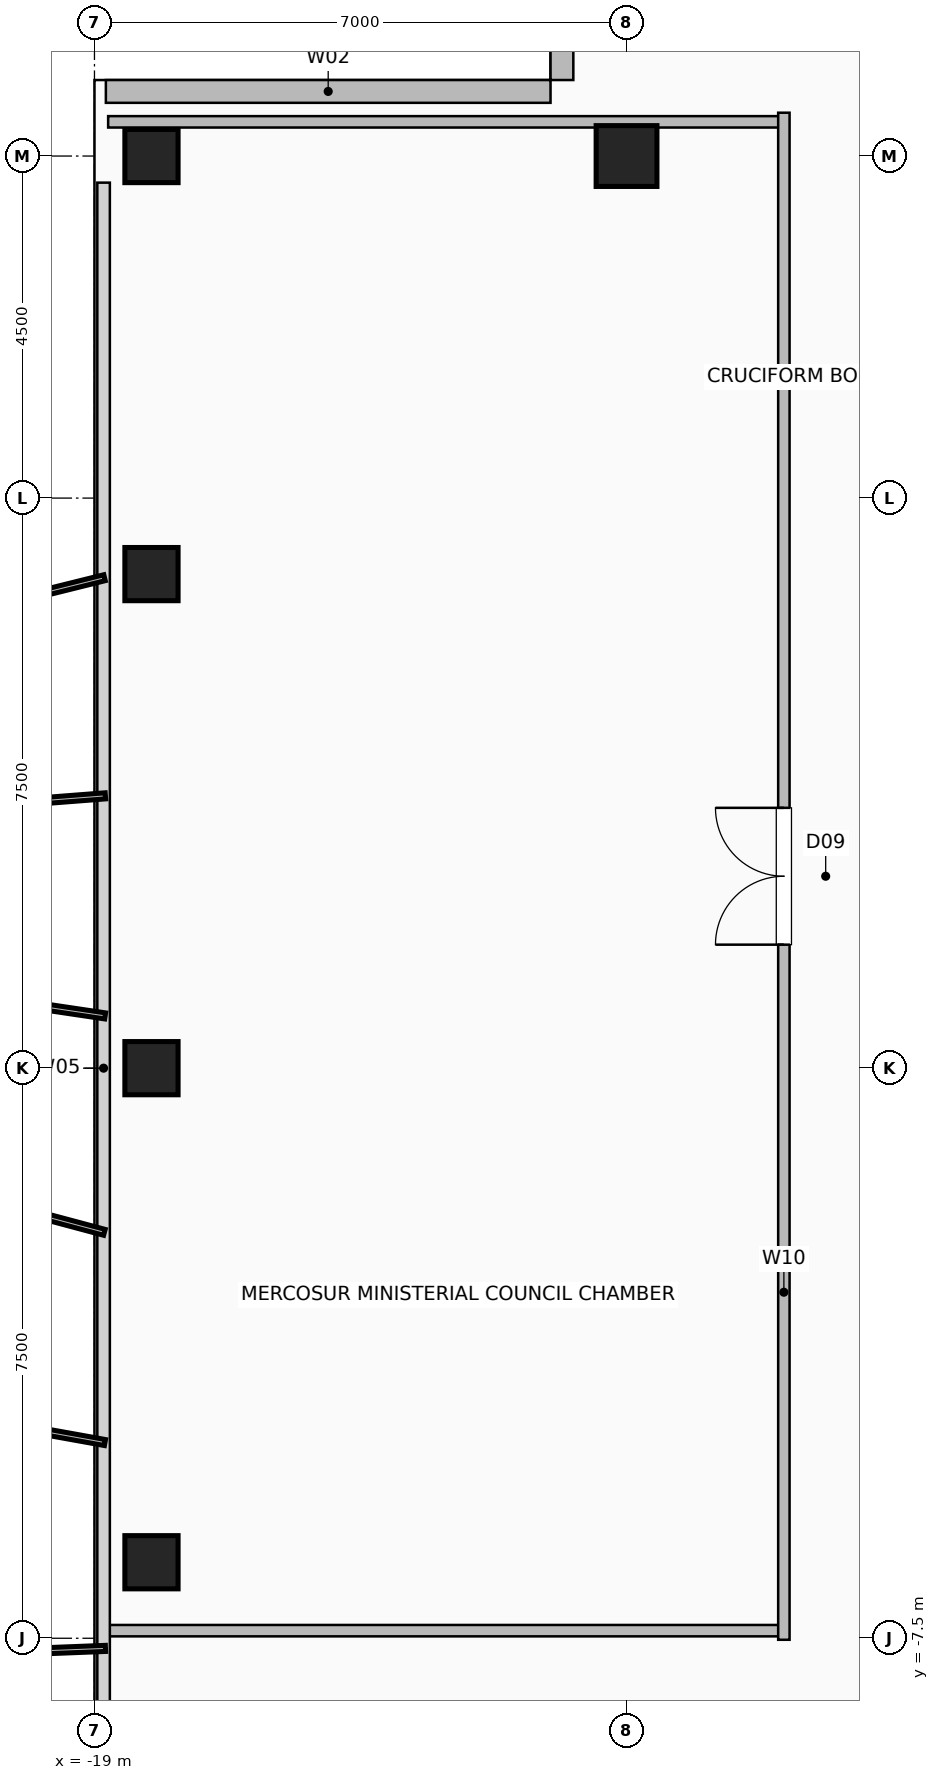
"""IFC4 building model, lengths in metres.
Left out: names, types, materials, properties, quantities, classifications, styles, units other than length and angle.
Written with IfcOpenShell. Run it as: python <this file> out.ifc"""

import sys

from ifc_helpers import new_model, si_unit, direction, frame, frame_2d, origin, origin_2d, place, context, subcontext, project, spatial, rectangle, hollow_rectangle, extrude, element, fill, save


model = new_model("IFC4")
c1 = context("Model", 3, precision=1e-05, world=origin(), true_north=direction((0.0, 1.0)))
c2 = subcontext(c1, "Body", "Model", "MODEL_VIEW")
j1 = project(units=[si_unit("LENGTHUNIT", "METRE"), si_unit("PLANEANGLEUNIT", "RADIAN")], contexts=[c1])
p1 = place(None, origin())
s1 = spatial("IfcSite", under=j1, at=p1, CompositionType="ELEMENT")
p2 = place(p1, origin())
s2 = spatial("IfcBuilding", under=s1, at=p2, CompositionType="ELEMENT")
p3 = place(p2, frame((0.0, 0.0, 250.4)))
s3 = spatial("IfcBuildingStorey", under=s2, at=p3, CompositionType="ELEMENT", Elevation=250.4)
for number, where, z_axis, x_axis in (
    (1, (-18.25, -6.5, 0.0), (0.0, 0.0, 1.0), (1.0, 0.0, 0.0)),
    (2, (-18.25, 0.0, 0.0), (0.0, 0.0, 1.0), (1.0, 0.0, 0.0)),
    (3, (-18.25, 6.5, 0.0), (0.0, 0.0, 1.0), (1.0, 0.0, 0.0)),
    (4, (-18.25, 12.0, 0.0), (0.0, 0.0, 1.0), (1.0, 0.0, 0.0)),
):
    element("IfcColumn", number, at=place(p3, frame(where, z_axis=z_axis, x_axis=x_axis)), inside=s3, PredefinedType="COLUMN", context=c2, shape_type="SweptSolid", body=[
        extrude(hollow_rectangle(XDim=0.7, YDim=0.7, WallThickness=0.035, at=origin_2d()), origin(), (0.0, 0.0, 1.0), 3.6),
    ])
p4 = place(p3, frame((-12.0, 12.0, 0.0), z_axis=(0.0, 0.0, 1.0), x_axis=(1.0, 0.0, 0.0)))
e5 = element("IfcColumn", 5, at=p4, inside=s3, PredefinedType="COLUMN", context=c2, shape_type="SweptSolid", body=[
    extrude(hollow_rectangle(XDim=0.8, YDim=0.8, WallThickness=0.04, at=origin_2d()), origin(), (0.0, 0.0, 1.0), 3.6),
])
p5 = place(p3, frame((-12.85, 18.85, 0.0), z_axis=(0.0, 0.0, 1.0), x_axis=(0.0, -1.0, 0.0)))
e6 = element("IfcWall", 6, at=p5, inside=s3, PredefinedType="SOLIDWALL", context=c2, shape_type="SweptSolid", body=[
    extrude(rectangle(XDim=5.85, YDim=0.3, at=frame_2d((2.925, 0.0))), origin(), (0.0, 0.0, 1.0), 3.36),
])
p6 = place(p5, frame((2.175, 0.0, 0.9)))
e7 = element("IfcOpeningElement", 7, at=p6, cuts=e6, PredefinedType="OPENING", context=c2, shape_type="SweptSolid", body=[
    extrude(rectangle(XDim=1.5, YDim=1.8, at=frame_2d((0.75, 0.9))), frame((0.0, 0.16, 0.0), z_axis=(0.0, -1.0, 0.0), x_axis=(1.0, 0.0, 0.0)), (0.0, 0.0, 1.0), 0.32),
])
p7 = place(p3, frame((-18.85, 12.85, 0.0), z_axis=(0.0, 0.0, 1.0), x_axis=(1.0, 0.0, 0.0)))
e8 = element("IfcWall", 8, at=p7, inside=s3, PredefinedType="SOLIDWALL", context=c2, shape_type="SweptSolid", body=[
    extrude(rectangle(XDim=5.85, YDim=0.3, at=frame_2d((2.925, 0.0))), origin(), (0.0, 0.0, 1.0), 3.36),
])
for number, where, z_axis, x_axis in (
    (9, (-18.82, -7.4, 0.0), (0.0, 0.0, 1.0), (1.0, 0.0, 0.0)),
    (10, (-18.82, 12.45, 0.0), (0.0, 0.0, 1.0), (1.0, 0.0, 0.0)),
):
    element("IfcWall", number, at=place(p3, frame(where, z_axis=z_axis, x_axis=x_axis)), inside=s3, PredefinedType="PARTITIONING", context=c2, shape_type="SweptSolid", body=[
        extrude(rectangle(XDim=8.89, YDim=0.15, at=frame_2d((4.445, 0.0))), origin(), (0.0, 0.0, 1.0), 3.36),
    ])
p8 = place(p3, frame((-9.93, -7.52, 0.0), z_axis=(0.0, 0.0, 1.0), x_axis=(0.0, 1.0, 0.0)))
e11 = element("IfcWall", 11, at=p8, inside=s3, PredefinedType="PARTITIONING", context=c2, shape_type="SweptSolid", body=[
    extrude(rectangle(XDim=20.09, YDim=0.15, at=frame_2d((10.045, 0.0))), origin(), (0.0, 0.0, 1.0), 3.36),
])
p9 = place(p8, frame((9.145, 0.0, 0.0)))
e12 = element("IfcOpeningElement", 12, at=p9, cuts=e11, PredefinedType="OPENING", context=c2, shape_type="SweptSolid", body=[
    extrude(rectangle(XDim=1.8, YDim=2.08, at=frame_2d((0.9, 1.04))), frame((0.0, 0.085, 0.0), z_axis=(0.0, -1.0, 0.0), x_axis=(1.0, 0.0, 0.0)), (0.0, 0.0, 1.0), 0.17),
])
p10 = place(p9, origin())
e13 = element("IfcDoor", 13, at=p10, inside=s3, OperationType="DOUBLE_DOOR_SINGLE_SWING", PredefinedType="DOOR", context=c2, shape_type="SweptSolid", body=[
    extrude(rectangle(XDim=1.8, YDim=2.08, at=frame_2d((0.9, 1.04))), frame((0.0, 0.025, 0.0), z_axis=(0.0, -1.0, 0.0), x_axis=(1.0, 0.0, 0.0)), (0.0, 0.0, 1.0), 0.05),
])
fill(e12, e13)
save(model, sys.argv[1])
